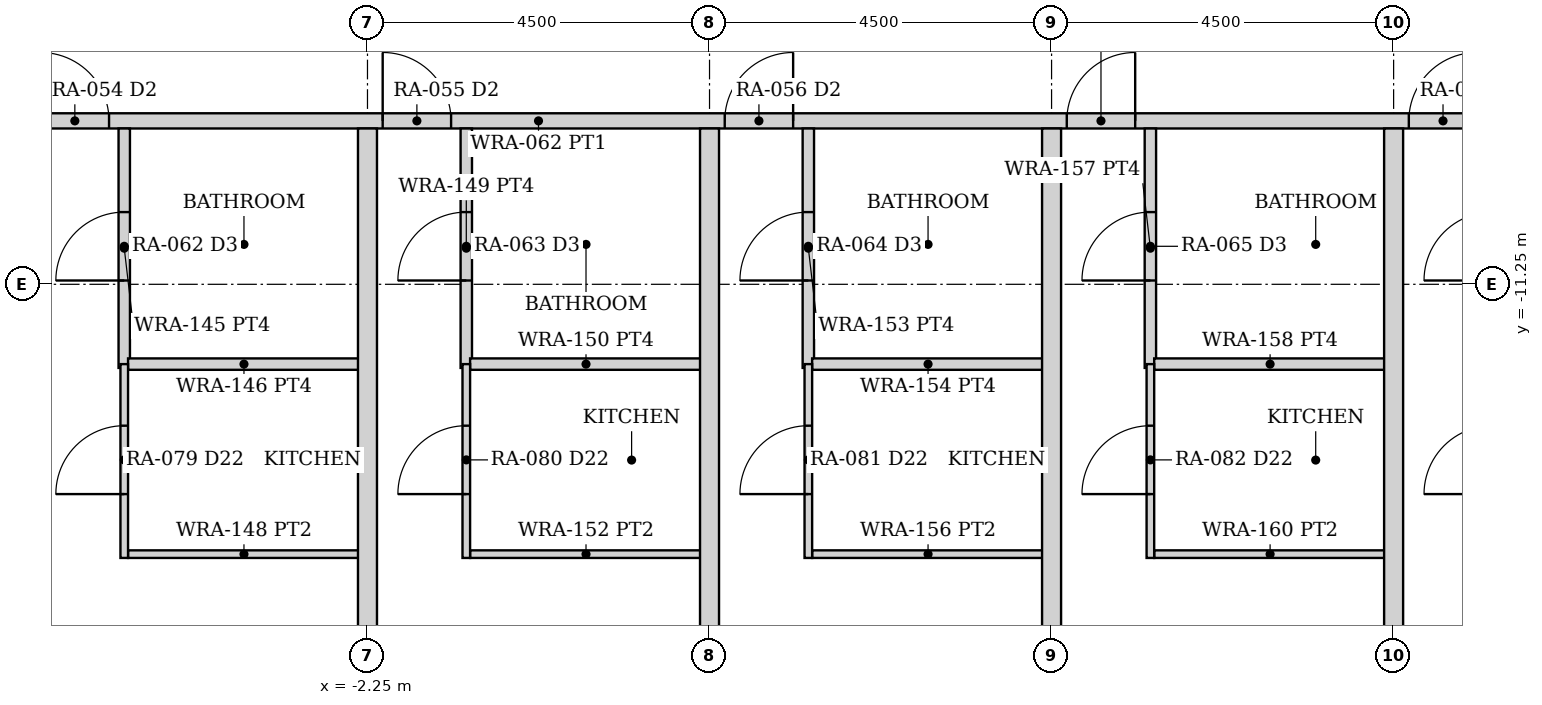
"""IFC4 building model, lengths in metres.
Left out: names, types, materials, properties, quantities, classifications, styles, units other than length and angle.
Written with IfcOpenShell. Run it as: python <this file> out.ifc"""

import sys

from ifc_helpers import new_model, si_unit, direction, frame, frame_2d, origin, place, context, subcontext, project, spatial, rectangle, extrude, element, fill, save


model = new_model("IFC4")
c1 = context("Model", 3, precision=1e-05, world=origin(), true_north=direction((0.0, 1.0)))
c2 = subcontext(c1, "Body", "Model", "MODEL_VIEW")
j1 = project(units=[si_unit("LENGTHUNIT", "METRE"), si_unit("PLANEANGLEUNIT", "RADIAN")], contexts=[c1])
p1 = place(None, origin())
s1 = spatial("IfcSite", under=j1, at=p1, CompositionType="ELEMENT")
p2 = place(p1, origin())
s2 = spatial("IfcBuilding", under=s1, at=p2, CompositionType="ELEMENT")
p3 = place(p2, frame((0.0, 0.0, 26.5)))
s3 = spatial("IfcBuildingStorey", under=s2, at=p3, CompositionType="ELEMENT", Elevation=26.5)
p4 = place(p3, frame((-24.55, -9.1, 0.0), z_axis=(0.0, 0.0, 1.0), x_axis=(1.0, 0.0, 0.0)))
e1 = element("IfcWall", 1, at=p4, inside=s3, PredefinedType="PARTITIONING", context=c2, shape_type="SweptSolid", body=[
    extrude(rectangle(XDim=49.1, YDim=0.2, at=frame_2d((24.55, 0.0))), origin(), (0.0, 0.0, 1.0), 2.373),
])
p5 = place(p4, frame((5.1, 0.0, 0.0)))
e2 = element("IfcOpeningElement", 2, at=p5, cuts=e1, PredefinedType="OPENING", context=c2, shape_type="SweptSolid", body=[
    extrude(rectangle(XDim=0.9, YDim=2.1, at=frame_2d((0.45, 1.05))), frame((0.0, 0.11, 0.0), z_axis=(0.0, -1.0, 0.0), x_axis=(1.0, 0.0, 0.0)), (0.0, 0.0, 1.0), 0.22),
])
p6 = place(p4, frame((9.0, 0.0, 0.0)))
e3 = element("IfcOpeningElement", 3, at=p6, cuts=e1, PredefinedType="OPENING", context=c2, shape_type="SweptSolid", body=[
    extrude(rectangle(XDim=0.9, YDim=2.1, at=frame_2d((0.45, 1.05))), frame((0.0, 0.11, 0.0), z_axis=(0.0, -1.0, 0.0), x_axis=(1.0, 0.0, 0.0)), (0.0, 0.0, 1.0), 0.22),
])
p7 = place(p4, frame((13.5, 0.0, 0.0)))
e4 = element("IfcOpeningElement", 4, at=p7, cuts=e1, PredefinedType="OPENING", context=c2, shape_type="SweptSolid", body=[
    extrude(rectangle(XDim=0.9, YDim=2.1, at=frame_2d((0.45, 1.05))), frame((0.0, 0.11, 0.0), z_axis=(0.0, -1.0, 0.0), x_axis=(1.0, 0.0, 0.0)), (0.0, 0.0, 1.0), 0.22),
])
p8 = place(p4, frame((18.0, 0.0, 0.0)))
e5 = element("IfcOpeningElement", 5, at=p8, cuts=e1, PredefinedType="OPENING", context=c2, shape_type="SweptSolid", body=[
    extrude(rectangle(XDim=0.9, YDim=2.1, at=frame_2d((0.45, 1.05))), frame((0.0, 0.11, 0.0), z_axis=(0.0, -1.0, 0.0), x_axis=(1.0, 0.0, 0.0)), (0.0, 0.0, 1.0), 0.22),
])
p9 = place(p4, frame((22.5, 0.0, 0.0)))
e6 = element("IfcOpeningElement", 6, at=p9, cuts=e1, PredefinedType="OPENING", context=c2, shape_type="SweptSolid", body=[
    extrude(rectangle(XDim=0.9, YDim=2.1, at=frame_2d((0.45, 1.05))), frame((0.0, 0.11, 0.0), z_axis=(0.0, -1.0, 0.0), x_axis=(1.0, 0.0, 0.0)), (0.0, 0.0, 1.0), 0.22),
])
p10 = place(p4, frame((27.0, 0.0, 0.0)))
e7 = element("IfcOpeningElement", 7, at=p10, cuts=e1, PredefinedType="OPENING", context=c2, shape_type="SweptSolid", body=[
    extrude(rectangle(XDim=0.9, YDim=2.1, at=frame_2d((0.45, 1.05))), frame((0.0, 0.11, 0.0), z_axis=(0.0, -1.0, 0.0), x_axis=(1.0, 0.0, 0.0)), (0.0, 0.0, 1.0), 0.22),
])
p11 = place(p4, frame((31.5, 0.0, 0.0)))
e8 = element("IfcOpeningElement", 8, at=p11, cuts=e1, PredefinedType="OPENING", context=c2, shape_type="SweptSolid", body=[
    extrude(rectangle(XDim=0.9, YDim=2.1, at=frame_2d((0.45, 1.05))), frame((0.0, 0.11, 0.0), z_axis=(0.0, -1.0, 0.0), x_axis=(1.0, 0.0, 0.0)), (0.0, 0.0, 1.0), 0.22),
])
p12 = place(p4, frame((36.0, 0.0, 0.0)))
e9 = element("IfcOpeningElement", 9, at=p12, cuts=e1, PredefinedType="OPENING", context=c2, shape_type="SweptSolid", body=[
    extrude(rectangle(XDim=0.9, YDim=2.1, at=frame_2d((0.45, 1.05))), frame((0.0, 0.11, 0.0), z_axis=(0.0, -1.0, 0.0), x_axis=(1.0, 0.0, 0.0)), (0.0, 0.0, 1.0), 0.22),
])
p13 = place(p4, frame((43.1, 0.0, 0.0)))
e10 = element("IfcOpeningElement", 10, at=p13, cuts=e1, PredefinedType="OPENING", context=c2, shape_type="SweptSolid", body=[
    extrude(rectangle(XDim=0.9, YDim=2.1, at=frame_2d((0.45, 1.05))), frame((0.0, 0.11, 0.0), z_axis=(0.0, -1.0, 0.0), x_axis=(1.0, 0.0, 0.0)), (0.0, 0.0, 1.0), 0.22),
])
p14 = place(p3, frame((-5.45, -12.35, 0.0), z_axis=(0.0, 0.0, 1.0), x_axis=(0.0, 1.0, 0.0)))
e11 = element("IfcWall", 11, at=p14, inside=s3, PredefinedType="PARTITIONING", context=c2, shape_type="SweptSolid", body=[
    extrude(rectangle(XDim=3.15, YDim=0.15, at=frame_2d((1.575, 0.0))), origin(), (0.0, 0.0, 1.0), 2.373),
])
p15 = place(p14, frame((1.15, 0.0, 0.0)))
e12 = element("IfcOpeningElement", 12, at=p15, cuts=e11, PredefinedType="OPENING", context=c2, shape_type="SweptSolid", body=[
    extrude(rectangle(XDim=0.9, YDim=2.1, at=frame_2d((0.45, 1.05))), frame((0.0, 0.085, 0.0), z_axis=(0.0, -1.0, 0.0), x_axis=(1.0, 0.0, 0.0)), (0.0, 0.0, 1.0), 0.17),
])
p16 = place(p3, frame((-5.4, -12.3, 0.0), z_axis=(0.0, 0.0, 1.0), x_axis=(1.0, 0.0, 0.0)))
e13 = element("IfcWall", 13, at=p16, inside=s3, PredefinedType="PARTITIONING", context=c2, shape_type="SweptSolid", body=[
    extrude(rectangle(XDim=3.05, YDim=0.15, at=frame_2d((1.525, 0.0))), origin(), (0.0, 0.0, 1.0), 2.373),
])
p17 = place(p3, frame((-5.4, -14.8, 0.0), z_axis=(0.0, 0.0, 1.0), x_axis=(1.0, 0.0, 0.0)))
e14 = element("IfcWall", 14, at=p17, inside=s3, PredefinedType="PARTITIONING", context=c2, shape_type="SweptSolid", body=[
    extrude(rectangle(XDim=3.05, YDim=0.1, at=frame_2d((1.525, 0.0))), origin(), (0.0, 0.0, 1.0), 2.373),
])
p18 = place(p3, frame((-5.45, -14.85, 0.0), z_axis=(0.0, 0.0, 1.0), x_axis=(0.0, 1.0, 0.0)))
e15 = element("IfcWall", 15, at=p18, inside=s3, PredefinedType="PARTITIONING", context=c2, shape_type="SweptSolid", body=[
    extrude(rectangle(XDim=2.55, YDim=0.1, at=frame_2d((1.275, 0.0))), origin(), (0.0, 0.0, 1.0), 2.373),
])
p19 = place(p18, frame((0.84, 0.0, 0.0)))
e16 = element("IfcOpeningElement", 16, at=p19, cuts=e15, PredefinedType="OPENING", context=c2, shape_type="SweptSolid", body=[
    extrude(rectangle(XDim=0.9, YDim=2.1, at=frame_2d((0.45, 1.05))), frame((0.0, 0.06, 0.0), z_axis=(0.0, -1.0, 0.0), x_axis=(1.0, 0.0, 0.0)), (0.0, 0.0, 1.0), 0.12),
])
p20 = place(p3, frame((-0.95, -12.35, 0.0), z_axis=(0.0, 0.0, 1.0), x_axis=(0.0, 1.0, 0.0)))
e17 = element("IfcWall", 17, at=p20, inside=s3, PredefinedType="PARTITIONING", context=c2, shape_type="SweptSolid", body=[
    extrude(rectangle(XDim=3.15, YDim=0.15, at=frame_2d((1.575, 0.0))), origin(), (0.0, 0.0, 1.0), 2.373),
])
p21 = place(p20, frame((1.15, 0.0, 0.0)))
e18 = element("IfcOpeningElement", 18, at=p21, cuts=e17, PredefinedType="OPENING", context=c2, shape_type="SweptSolid", body=[
    extrude(rectangle(XDim=0.9, YDim=2.1, at=frame_2d((0.45, 1.05))), frame((0.0, 0.085, 0.0), z_axis=(0.0, -1.0, 0.0), x_axis=(1.0, 0.0, 0.0)), (0.0, 0.0, 1.0), 0.17),
])
p22 = place(p3, frame((-0.9, -12.3, 0.0), z_axis=(0.0, 0.0, 1.0), x_axis=(1.0, 0.0, 0.0)))
e19 = element("IfcWall", 19, at=p22, inside=s3, PredefinedType="PARTITIONING", context=c2, shape_type="SweptSolid", body=[
    extrude(rectangle(XDim=3.05, YDim=0.15, at=frame_2d((1.525, 0.0))), origin(), (0.0, 0.0, 1.0), 2.373),
])
p23 = place(p3, frame((-0.9, -14.8, 0.0), z_axis=(0.0, 0.0, 1.0), x_axis=(1.0, 0.0, 0.0)))
e20 = element("IfcWall", 20, at=p23, inside=s3, PredefinedType="PARTITIONING", context=c2, shape_type="SweptSolid", body=[
    extrude(rectangle(XDim=3.05, YDim=0.1, at=frame_2d((1.525, 0.0))), origin(), (0.0, 0.0, 1.0), 2.373),
])
p24 = place(p3, frame((-0.95, -14.85, 0.0), z_axis=(0.0, 0.0, 1.0), x_axis=(0.0, 1.0, 0.0)))
e21 = element("IfcWall", 21, at=p24, inside=s3, PredefinedType="PARTITIONING", context=c2, shape_type="SweptSolid", body=[
    extrude(rectangle(XDim=2.55, YDim=0.1, at=frame_2d((1.275, 0.0))), origin(), (0.0, 0.0, 1.0), 2.373),
])
p25 = place(p24, frame((0.84, 0.0, 0.0)))
e22 = element("IfcOpeningElement", 22, at=p25, cuts=e21, PredefinedType="OPENING", context=c2, shape_type="SweptSolid", body=[
    extrude(rectangle(XDim=0.9, YDim=2.1, at=frame_2d((0.45, 1.05))), frame((0.0, 0.06, 0.0), z_axis=(0.0, -1.0, 0.0), x_axis=(1.0, 0.0, 0.0)), (0.0, 0.0, 1.0), 0.12),
])
p26 = place(p3, frame((3.55, -12.35, 0.0), z_axis=(0.0, 0.0, 1.0), x_axis=(0.0, 1.0, 0.0)))
e23 = element("IfcWall", 23, at=p26, inside=s3, PredefinedType="PARTITIONING", context=c2, shape_type="SweptSolid", body=[
    extrude(rectangle(XDim=3.15, YDim=0.15, at=frame_2d((1.575, 0.0))), origin(), (0.0, 0.0, 1.0), 2.373),
])
p27 = place(p26, frame((1.15, 0.0, 0.0)))
e24 = element("IfcOpeningElement", 24, at=p27, cuts=e23, PredefinedType="OPENING", context=c2, shape_type="SweptSolid", body=[
    extrude(rectangle(XDim=0.9, YDim=2.1, at=frame_2d((0.45, 1.05))), frame((0.0, 0.085, 0.0), z_axis=(0.0, -1.0, 0.0), x_axis=(1.0, 0.0, 0.0)), (0.0, 0.0, 1.0), 0.17),
])
p28 = place(p3, frame((3.6, -12.3, 0.0), z_axis=(0.0, 0.0, 1.0), x_axis=(1.0, 0.0, 0.0)))
e25 = element("IfcWall", 25, at=p28, inside=s3, PredefinedType="PARTITIONING", context=c2, shape_type="SweptSolid", body=[
    extrude(rectangle(XDim=3.05, YDim=0.15, at=frame_2d((1.525, 0.0))), origin(), (0.0, 0.0, 1.0), 2.373),
])
p29 = place(p3, frame((3.6, -14.8, 0.0), z_axis=(0.0, 0.0, 1.0), x_axis=(1.0, 0.0, 0.0)))
e26 = element("IfcWall", 26, at=p29, inside=s3, PredefinedType="PARTITIONING", context=c2, shape_type="SweptSolid", body=[
    extrude(rectangle(XDim=3.05, YDim=0.1, at=frame_2d((1.525, 0.0))), origin(), (0.0, 0.0, 1.0), 2.373),
])
p30 = place(p3, frame((3.55, -14.85, 0.0), z_axis=(0.0, 0.0, 1.0), x_axis=(0.0, 1.0, 0.0)))
e27 = element("IfcWall", 27, at=p30, inside=s3, PredefinedType="PARTITIONING", context=c2, shape_type="SweptSolid", body=[
    extrude(rectangle(XDim=2.55, YDim=0.1, at=frame_2d((1.275, 0.0))), origin(), (0.0, 0.0, 1.0), 2.373),
])
p31 = place(p30, frame((0.84, 0.0, 0.0)))
e28 = element("IfcOpeningElement", 28, at=p31, cuts=e27, PredefinedType="OPENING", context=c2, shape_type="SweptSolid", body=[
    extrude(rectangle(XDim=0.9, YDim=2.1, at=frame_2d((0.45, 1.05))), frame((0.0, 0.06, 0.0), z_axis=(0.0, -1.0, 0.0), x_axis=(1.0, 0.0, 0.0)), (0.0, 0.0, 1.0), 0.12),
])
p32 = place(p3, frame((8.05, -12.35, 0.0), z_axis=(0.0, 0.0, 1.0), x_axis=(0.0, 1.0, 0.0)))
e29 = element("IfcWall", 29, at=p32, inside=s3, PredefinedType="PARTITIONING", context=c2, shape_type="SweptSolid", body=[
    extrude(rectangle(XDim=3.15, YDim=0.15, at=frame_2d((1.575, 0.0))), origin(), (0.0, 0.0, 1.0), 2.373),
])
p33 = place(p32, frame((1.15, 0.0, 0.0)))
e30 = element("IfcOpeningElement", 30, at=p33, cuts=e29, PredefinedType="OPENING", context=c2, shape_type="SweptSolid", body=[
    extrude(rectangle(XDim=0.9, YDim=2.1, at=frame_2d((0.45, 1.05))), frame((0.0, 0.085, 0.0), z_axis=(0.0, -1.0, 0.0), x_axis=(1.0, 0.0, 0.0)), (0.0, 0.0, 1.0), 0.17),
])
p34 = place(p3, frame((8.1, -12.3, 0.0), z_axis=(0.0, 0.0, 1.0), x_axis=(1.0, 0.0, 0.0)))
e31 = element("IfcWall", 31, at=p34, inside=s3, PredefinedType="PARTITIONING", context=c2, shape_type="SweptSolid", body=[
    extrude(rectangle(XDim=3.05, YDim=0.15, at=frame_2d((1.525, 0.0))), origin(), (0.0, 0.0, 1.0), 2.373),
])
p35 = place(p3, frame((8.1, -14.8, 0.0), z_axis=(0.0, 0.0, 1.0), x_axis=(1.0, 0.0, 0.0)))
e32 = element("IfcWall", 32, at=p35, inside=s3, PredefinedType="PARTITIONING", context=c2, shape_type="SweptSolid", body=[
    extrude(rectangle(XDim=3.05, YDim=0.1, at=frame_2d((1.525, 0.0))), origin(), (0.0, 0.0, 1.0), 2.373),
])
p36 = place(p3, frame((8.05, -14.85, 0.0), z_axis=(0.0, 0.0, 1.0), x_axis=(0.0, 1.0, 0.0)))
e33 = element("IfcWall", 33, at=p36, inside=s3, PredefinedType="PARTITIONING", context=c2, shape_type="SweptSolid", body=[
    extrude(rectangle(XDim=2.55, YDim=0.1, at=frame_2d((1.275, 0.0))), origin(), (0.0, 0.0, 1.0), 2.373),
])
p37 = place(p36, frame((0.84, 0.0, 0.0)))
e34 = element("IfcOpeningElement", 34, at=p37, cuts=e33, PredefinedType="OPENING", context=c2, shape_type="SweptSolid", body=[
    extrude(rectangle(XDim=0.9, YDim=2.1, at=frame_2d((0.45, 1.05))), frame((0.0, 0.06, 0.0), z_axis=(0.0, -1.0, 0.0), x_axis=(1.0, 0.0, 0.0)), (0.0, 0.0, 1.0), 0.12),
])
for number, where, z_axis, x_axis in (
    (35, (-2.25, -24.35, 0.0), (0.0, 0.0, 1.0), (0.0, 1.0, 0.0)),
    (36, (2.25, -24.35, 0.0), (0.0, 0.0, 1.0), (0.0, 1.0, 0.0)),
    (37, (6.75, -24.35, 0.0), (0.0, 0.0, 1.0), (0.0, 1.0, 0.0)),
    (38, (11.25, -24.35, 0.0), (0.0, 0.0, 1.0), (0.0, 1.0, 0.0)),
):
    element("IfcWall", number, at=place(p3, frame(where, z_axis=z_axis, x_axis=x_axis)), inside=s3, PredefinedType="PARTITIONING", context=c2, shape_type="SweptSolid", body=[
        extrude(rectangle(XDim=15.15, YDim=0.25, at=frame_2d((7.575, 0.0))), origin(), (0.0, 0.0, 1.0), 2.373),
    ])
p38 = place(p8, origin())
e39 = element("IfcDoor", 39, at=p38, inside=s3, OperationType="SINGLE_SWING_LEFT", PredefinedType="DOOR", context=c2, shape_type="SweptSolid", body=[
    extrude(rectangle(XDim=0.9, YDim=2.1, at=frame_2d((0.45, 1.05))), frame((0.0, 0.025, 0.0), z_axis=(0.0, -1.0, 0.0), x_axis=(1.0, 0.0, 0.0)), (0.0, 0.0, 1.0), 0.05),
])
fill(e5, e39)
p39 = place(p15, origin())
e40 = element("IfcDoor", 40, at=p39, inside=s3, OperationType="SINGLE_SWING_LEFT", PredefinedType="DOOR", context=c2, shape_type="SweptSolid", body=[
    extrude(rectangle(XDim=0.9, YDim=2.1, at=frame_2d((0.45, 1.05))), frame((0.0, 0.025, 0.0), z_axis=(0.0, -1.0, 0.0), x_axis=(1.0, 0.0, 0.0)), (0.0, 0.0, 1.0), 0.05),
])
fill(e12, e40)
p40 = place(p19, origin())
e41 = element("IfcDoor", 41, at=p40, inside=s3, OperationType="SINGLE_SWING_LEFT", PredefinedType="DOOR", context=c2, shape_type="SweptSolid", body=[
    extrude(rectangle(XDim=0.9, YDim=2.1, at=frame_2d((0.45, 1.05))), frame((0.0, 0.025, 0.0), z_axis=(0.0, -1.0, 0.0), x_axis=(1.0, 0.0, 0.0)), (0.0, 0.0, 1.0), 0.05),
])
fill(e16, e41)
p41 = place(p9, origin())
e42 = element("IfcDoor", 42, at=p41, inside=s3, OperationType="SINGLE_SWING_LEFT", PredefinedType="DOOR", context=c2, shape_type="SweptSolid", body=[
    extrude(rectangle(XDim=0.9, YDim=2.1, at=frame_2d((0.45, 1.05))), frame((0.0, 0.025, 0.0), z_axis=(0.0, -1.0, 0.0), x_axis=(1.0, 0.0, 0.0)), (0.0, 0.0, 1.0), 0.05),
])
fill(e6, e42)
p42 = place(p21, origin())
e43 = element("IfcDoor", 43, at=p42, inside=s3, OperationType="SINGLE_SWING_LEFT", PredefinedType="DOOR", context=c2, shape_type="SweptSolid", body=[
    extrude(rectangle(XDim=0.9, YDim=2.1, at=frame_2d((0.45, 1.05))), frame((0.0, 0.025, 0.0), z_axis=(0.0, -1.0, 0.0), x_axis=(1.0, 0.0, 0.0)), (0.0, 0.0, 1.0), 0.05),
])
fill(e18, e43)
p43 = place(p25, origin())
e44 = element("IfcDoor", 44, at=p43, inside=s3, OperationType="SINGLE_SWING_LEFT", PredefinedType="DOOR", context=c2, shape_type="SweptSolid", body=[
    extrude(rectangle(XDim=0.9, YDim=2.1, at=frame_2d((0.45, 1.05))), frame((0.0, 0.025, 0.0), z_axis=(0.0, -1.0, 0.0), x_axis=(1.0, 0.0, 0.0)), (0.0, 0.0, 1.0), 0.05),
])
fill(e22, e44)
p44 = place(p10, origin())
e45 = element("IfcDoor", 45, at=p44, inside=s3, OperationType="SINGLE_SWING_RIGHT", PredefinedType="DOOR", context=c2, shape_type="SweptSolid", body=[
    extrude(rectangle(XDim=0.9, YDim=2.1, at=frame_2d((0.45, 1.05))), frame((0.0, 0.025, 0.0), z_axis=(0.0, -1.0, 0.0), x_axis=(1.0, 0.0, 0.0)), (0.0, 0.0, 1.0), 0.05),
])
fill(e7, e45)
p45 = place(p27, origin())
e46 = element("IfcDoor", 46, at=p45, inside=s3, OperationType="SINGLE_SWING_LEFT", PredefinedType="DOOR", context=c2, shape_type="SweptSolid", body=[
    extrude(rectangle(XDim=0.9, YDim=2.1, at=frame_2d((0.45, 1.05))), frame((0.0, 0.025, 0.0), z_axis=(0.0, -1.0, 0.0), x_axis=(1.0, 0.0, 0.0)), (0.0, 0.0, 1.0), 0.05),
])
fill(e24, e46)
p46 = place(p31, origin())
e47 = element("IfcDoor", 47, at=p46, inside=s3, OperationType="SINGLE_SWING_LEFT", PredefinedType="DOOR", context=c2, shape_type="SweptSolid", body=[
    extrude(rectangle(XDim=0.9, YDim=2.1, at=frame_2d((0.45, 1.05))), frame((0.0, 0.025, 0.0), z_axis=(0.0, -1.0, 0.0), x_axis=(1.0, 0.0, 0.0)), (0.0, 0.0, 1.0), 0.05),
])
fill(e28, e47)
p47 = place(p11, origin())
e48 = element("IfcDoor", 48, at=p47, inside=s3, OperationType="SINGLE_SWING_RIGHT", PredefinedType="DOOR", context=c2, shape_type="SweptSolid", body=[
    extrude(rectangle(XDim=0.9, YDim=2.1, at=frame_2d((0.45, 1.05))), frame((0.0, 0.025, 0.0), z_axis=(0.0, -1.0, 0.0), x_axis=(1.0, 0.0, 0.0)), (0.0, 0.0, 1.0), 0.05),
])
fill(e8, e48)
p48 = place(p33, origin())
e49 = element("IfcDoor", 49, at=p48, inside=s3, OperationType="SINGLE_SWING_LEFT", PredefinedType="DOOR", context=c2, shape_type="SweptSolid", body=[
    extrude(rectangle(XDim=0.9, YDim=2.1, at=frame_2d((0.45, 1.05))), frame((0.0, 0.025, 0.0), z_axis=(0.0, -1.0, 0.0), x_axis=(1.0, 0.0, 0.0)), (0.0, 0.0, 1.0), 0.05),
])
fill(e30, e49)
p49 = place(p37, origin())
e50 = element("IfcDoor", 50, at=p49, inside=s3, OperationType="SINGLE_SWING_LEFT", PredefinedType="DOOR", context=c2, shape_type="SweptSolid", body=[
    extrude(rectangle(XDim=0.9, YDim=2.1, at=frame_2d((0.45, 1.05))), frame((0.0, 0.025, 0.0), z_axis=(0.0, -1.0, 0.0), x_axis=(1.0, 0.0, 0.0)), (0.0, 0.0, 1.0), 0.05),
])
fill(e34, e50)
p50 = place(p12, origin())
e51 = element("IfcDoor", 51, at=p50, inside=s3, OperationType="SINGLE_SWING_RIGHT", PredefinedType="DOOR", context=c2, shape_type="SweptSolid", body=[
    extrude(rectangle(XDim=0.9, YDim=2.1, at=frame_2d((0.45, 1.05))), frame((0.0, 0.025, 0.0), z_axis=(0.0, -1.0, 0.0), x_axis=(1.0, 0.0, 0.0)), (0.0, 0.0, 1.0), 0.05),
])
fill(e9, e51)
save(model, sys.argv[1])
